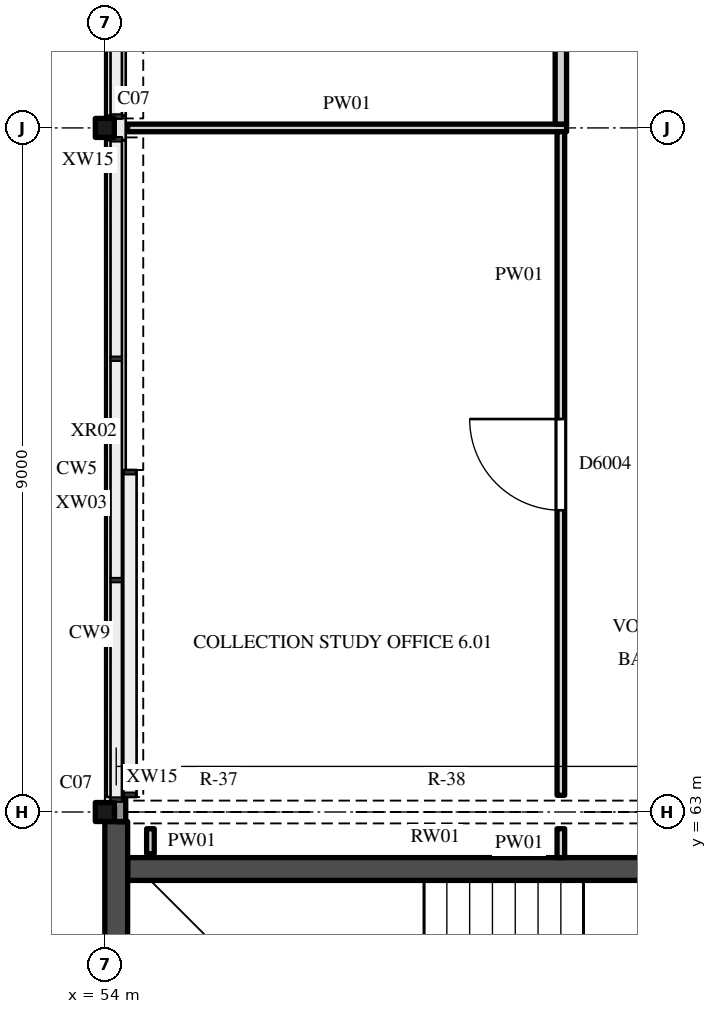
"""IFC4 building model, lengths in metres.
Left out: names, types, materials, properties, quantities, classifications, styles, units other than length and angle.
Written with IfcOpenShell. Run it as: python <this file> out.ifc"""

import sys

from ifc_helpers import new_model, si_unit, direction, frame, frame_2d, origin, origin_2d, place, context, subcontext, project, spatial, polyline, rectangle, hollow_rectangle, outline, extrude, element, fill, save


model = new_model("IFC4")
c1 = context("Model", 3, precision=1e-05, world=origin(), true_north=direction((0.0, 1.0)))
c2 = subcontext(c1, "Body", "Model", "MODEL_VIEW")
j1 = project(units=[si_unit("LENGTHUNIT", "METRE"), si_unit("PLANEANGLEUNIT", "RADIAN")], contexts=[c1])
p1 = place(None, origin())
s1 = spatial("IfcSite", under=j1, at=p1, CompositionType="ELEMENT")
p2 = place(p1, origin())
s2 = spatial("IfcBuilding", under=s1, at=p2, CompositionType="ELEMENT")
p3 = place(p2, frame((0.0, 0.0, 36.0)))
s3 = spatial("IfcBuildingStorey", under=s2, at=p3, CompositionType="ELEMENT", Elevation=36.0)
for number, where, z_axis, x_axis in (
    (1, (54.0, 63.0, 0.0), (0.0, 0.0, 1.0), (1.0, 0.0, 0.0)),
    (2, (54.0, 72.0, 0.0), (0.0, 0.0, 1.0), (1.0, 0.0, 0.0)),
):
    element("IfcColumn", number, at=place(p3, frame(where, z_axis=z_axis, x_axis=x_axis)), inside=s3, PredefinedType="COLUMN", context=c2, shape_type="SweptSolid", body=[
        extrude(hollow_rectangle(XDim=0.25, YDim=0.25, WallThickness=0.009, InnerFilletRadius=0.013, OuterFilletRadius=0.022, at=origin_2d()), origin(), (0.0, 0.0, 1.0), 8.0),
    ])
p4 = place(p3, frame((54.3, 62.25, 0.0), z_axis=(0.0, 0.0, 1.0), x_axis=(1.0, 0.0, 0.0)))
e3 = element("IfcWall", 3, at=p4, inside=s3, PredefinedType="SHEAR", context=c2, shape_type="SweptSolid", body=[
    extrude(rectangle(XDim=8.1, YDim=0.3, at=frame_2d((4.05, 0.0))), origin(), (0.0, 0.0, 1.0), 14.344),
])
p5 = place(p3, frame((54.15, 54.125, 0.0), z_axis=(0.0, 0.0, 1.0), x_axis=(0.0, 1.0, 0.0)))
e4 = element("IfcWall", 4, at=p5, inside=s3, PredefinedType="SHEAR", context=c2, shape_type="SweptSolid", body=[
    extrude(outline(polyline([(0.0, 0.0), (8.75, 0.0), (8.75, 14.844), (0.0, 7.844), (0.0, 0.0)])), frame((0.0, 0.15, 0.0), z_axis=(0.0, -1.0, 0.0), x_axis=(1.0, 0.0, 0.0)), (0.0, 0.0, 1.0), 0.3),
])
for number, where, z_axis, x_axis in (
    (5, (54.15, 63.197, 0.0), (0.0, 0.0, 1.0), (0.0, 1.0, 0.0)),
    (6, (54.15, 72.161, 0.0), (0.0, 0.0, 1.0), (0.0, 1.0, 0.0)),
):
    element("IfcWall", number, at=place(p3, frame(where, z_axis=z_axis, x_axis=x_axis)), inside=s3, PredefinedType="SOLIDWALL", context=c2, shape_type="SweptSolid", body=[
        extrude(rectangle(XDim=8.642, YDim=0.25, at=frame_2d((4.321, 0.0))), origin(), (0.0, 0.0, 1.0), 1.1),
    ])
p6 = place(p3, frame((54.2, 62.875, 0.0), z_axis=(0.0, 0.0, 1.0), x_axis=(0.0, 1.0, 0.0)))
e7 = element("IfcWall", 7, at=p6, inside=s3, PredefinedType="SOLIDWALL", context=c2, shape_type="SweptSolid", body=[
    extrude(rectangle(XDim=0.322, YDim=0.15, at=frame_2d((0.161, 0.0))), origin(), (0.0, 0.0, 1.0), 14.844),
])
p7 = place(p3, frame((54.2, 71.839, 0.0), z_axis=(0.0, 0.0, 1.0), x_axis=(0.0, 1.0, 0.0)))
e8 = element("IfcWall", 8, at=p7, inside=s3, PredefinedType="SOLIDWALL", context=c2, shape_type="SweptSolid", body=[
    extrude(rectangle(XDim=0.322, YDim=0.15, at=frame_2d((0.161, 0.0))), origin(), (0.0, 0.0, 1.0), 1.1),
])
p8 = place(p3, frame((54.15, 63.0, 15.2), z_axis=(0.0, 0.0, 1.0), x_axis=(1.0, 0.0, 0.0)))
e9 = element("IfcWall", 9, at=p8, inside=s3, PredefinedType="SOLIDWALL", context=c2, shape_type="SweptSolid", body=[
    extrude(rectangle(XDim=62.7, YDim=0.3, at=frame_2d((31.35, 0.0))), origin(), (0.0, 0.0, 1.0), 0.9),
])
p9 = place(p8, frame((0.15, 0.0, 0.15)))
e10 = element("IfcOpeningElement", 10, at=p9, cuts=e9, PredefinedType="OPENING", context=c2, shape_type="SweptSolid", body=[
    extrude(rectangle(XDim=2.4, YDim=0.6, at=frame_2d((1.2, 0.3))), frame((0.0, 0.16, 0.0), z_axis=(0.0, -1.0, 0.0), x_axis=(1.0, 0.0, 0.0)), (0.0, 0.0, 1.0), 0.32),
])
p10 = place(p8, frame((3.15, 0.0, 0.15)))
e11 = element("IfcOpeningElement", 11, at=p10, cuts=e9, PredefinedType="OPENING", context=c2, shape_type="SweptSolid", body=[
    extrude(rectangle(XDim=2.4, YDim=0.6, at=frame_2d((1.2, 0.3))), frame((0.0, 0.16, 0.0), z_axis=(0.0, -1.0, 0.0), x_axis=(1.0, 0.0, 0.0)), (0.0, 0.0, 1.0), 0.32),
])
p11 = place(p8, frame((6.15, 0.0, 0.15)))
e12 = element("IfcOpeningElement", 12, at=p11, cuts=e9, PredefinedType="OPENING", context=c2, shape_type="SweptSolid", body=[
    extrude(rectangle(XDim=2.4, YDim=0.6, at=frame_2d((1.2, 0.3))), frame((0.0, 0.16, 0.0), z_axis=(0.0, -1.0, 0.0), x_axis=(1.0, 0.0, 0.0)), (0.0, 0.0, 1.0), 0.32),
])
p12 = place(p8, frame((9.15, 0.0, 0.15)))
e13 = element("IfcOpeningElement", 13, at=p12, cuts=e9, PredefinedType="OPENING", context=c2, shape_type="SweptSolid", body=[
    extrude(rectangle(XDim=2.4, YDim=0.6, at=frame_2d((1.2, 0.3))), frame((0.0, 0.16, 0.0), z_axis=(0.0, -1.0, 0.0), x_axis=(1.0, 0.0, 0.0)), (0.0, 0.0, 1.0), 0.32),
])
p13 = place(p8, frame((12.15, 0.0, 0.15)))
e14 = element("IfcOpeningElement", 14, at=p13, cuts=e9, PredefinedType="OPENING", context=c2, shape_type="SweptSolid", body=[
    extrude(rectangle(XDim=2.4, YDim=0.6, at=frame_2d((1.2, 0.3))), frame((0.0, 0.16, 0.0), z_axis=(0.0, -1.0, 0.0), x_axis=(1.0, 0.0, 0.0)), (0.0, 0.0, 1.0), 0.32),
])
p14 = place(p8, frame((15.15, 0.0, 0.15)))
e15 = element("IfcOpeningElement", 15, at=p14, cuts=e9, PredefinedType="OPENING", context=c2, shape_type="SweptSolid", body=[
    extrude(rectangle(XDim=2.4, YDim=0.6, at=frame_2d((1.2, 0.3))), frame((0.0, 0.16, 0.0), z_axis=(0.0, -1.0, 0.0), x_axis=(1.0, 0.0, 0.0)), (0.0, 0.0, 1.0), 0.32),
])
p15 = place(p8, frame((18.15, 0.0, 0.15)))
e16 = element("IfcOpeningElement", 16, at=p15, cuts=e9, PredefinedType="OPENING", context=c2, shape_type="SweptSolid", body=[
    extrude(rectangle(XDim=2.4, YDim=0.6, at=frame_2d((1.2, 0.3))), frame((0.0, 0.16, 0.0), z_axis=(0.0, -1.0, 0.0), x_axis=(1.0, 0.0, 0.0)), (0.0, 0.0, 1.0), 0.32),
])
p16 = place(p8, frame((21.15, 0.0, 0.15)))
e17 = element("IfcOpeningElement", 17, at=p16, cuts=e9, PredefinedType="OPENING", context=c2, shape_type="SweptSolid", body=[
    extrude(rectangle(XDim=2.4, YDim=0.6, at=frame_2d((1.2, 0.3))), frame((0.0, 0.16, 0.0), z_axis=(0.0, -1.0, 0.0), x_axis=(1.0, 0.0, 0.0)), (0.0, 0.0, 1.0), 0.32),
])
p17 = place(p8, frame((24.15, 0.0, 0.15)))
e18 = element("IfcOpeningElement", 18, at=p17, cuts=e9, PredefinedType="OPENING", context=c2, shape_type="SweptSolid", body=[
    extrude(rectangle(XDim=2.4, YDim=0.6, at=frame_2d((1.2, 0.3))), frame((0.0, 0.16, 0.0), z_axis=(0.0, -1.0, 0.0), x_axis=(1.0, 0.0, 0.0)), (0.0, 0.0, 1.0), 0.32),
])
p18 = place(p8, frame((27.15, 0.0, 0.15)))
e19 = element("IfcOpeningElement", 19, at=p18, cuts=e9, PredefinedType="OPENING", context=c2, shape_type="SweptSolid", body=[
    extrude(rectangle(XDim=2.4, YDim=0.6, at=frame_2d((1.2, 0.3))), frame((0.0, 0.16, 0.0), z_axis=(0.0, -1.0, 0.0), x_axis=(1.0, 0.0, 0.0)), (0.0, 0.0, 1.0), 0.32),
])
p19 = place(p8, frame((30.15, 0.0, 0.15)))
e20 = element("IfcOpeningElement", 20, at=p19, cuts=e9, PredefinedType="OPENING", context=c2, shape_type="SweptSolid", body=[
    extrude(rectangle(XDim=2.4, YDim=0.6, at=frame_2d((1.2, 0.3))), frame((0.0, 0.16, 0.0), z_axis=(0.0, -1.0, 0.0), x_axis=(1.0, 0.0, 0.0)), (0.0, 0.0, 1.0), 0.32),
])
p20 = place(p8, frame((33.15, 0.0, 0.15)))
e21 = element("IfcOpeningElement", 21, at=p20, cuts=e9, PredefinedType="OPENING", context=c2, shape_type="SweptSolid", body=[
    extrude(rectangle(XDim=2.4, YDim=0.6, at=frame_2d((1.2, 0.3))), frame((0.0, 0.16, 0.0), z_axis=(0.0, -1.0, 0.0), x_axis=(1.0, 0.0, 0.0)), (0.0, 0.0, 1.0), 0.32),
])
p21 = place(p8, frame((36.15, 0.0, 0.15)))
e22 = element("IfcOpeningElement", 22, at=p21, cuts=e9, PredefinedType="OPENING", context=c2, shape_type="SweptSolid", body=[
    extrude(rectangle(XDim=2.4, YDim=0.6, at=frame_2d((1.2, 0.3))), frame((0.0, 0.16, 0.0), z_axis=(0.0, -1.0, 0.0), x_axis=(1.0, 0.0, 0.0)), (0.0, 0.0, 1.0), 0.32),
])
p22 = place(p8, frame((39.15, 0.0, 0.15)))
e23 = element("IfcOpeningElement", 23, at=p22, cuts=e9, PredefinedType="OPENING", context=c2, shape_type="SweptSolid", body=[
    extrude(rectangle(XDim=2.4, YDim=0.6, at=frame_2d((1.2, 0.3))), frame((0.0, 0.16, 0.0), z_axis=(0.0, -1.0, 0.0), x_axis=(1.0, 0.0, 0.0)), (0.0, 0.0, 1.0), 0.32),
])
p23 = place(p8, frame((42.15, 0.0, 0.15)))
e24 = element("IfcOpeningElement", 24, at=p23, cuts=e9, PredefinedType="OPENING", context=c2, shape_type="SweptSolid", body=[
    extrude(rectangle(XDim=2.4, YDim=0.6, at=frame_2d((1.2, 0.3))), frame((0.0, 0.16, 0.0), z_axis=(0.0, -1.0, 0.0), x_axis=(1.0, 0.0, 0.0)), (0.0, 0.0, 1.0), 0.32),
])
p24 = place(p8, frame((45.15, 0.0, 0.15)))
e25 = element("IfcOpeningElement", 25, at=p24, cuts=e9, PredefinedType="OPENING", context=c2, shape_type="SweptSolid", body=[
    extrude(rectangle(XDim=2.4, YDim=0.6, at=frame_2d((1.2, 0.3))), frame((0.0, 0.16, 0.0), z_axis=(0.0, -1.0, 0.0), x_axis=(1.0, 0.0, 0.0)), (0.0, 0.0, 1.0), 0.32),
])
p25 = place(p8, frame((48.15, 0.0, 0.15)))
e26 = element("IfcOpeningElement", 26, at=p25, cuts=e9, PredefinedType="OPENING", context=c2, shape_type="SweptSolid", body=[
    extrude(rectangle(XDim=2.4, YDim=0.6, at=frame_2d((1.2, 0.3))), frame((0.0, 0.16, 0.0), z_axis=(0.0, -1.0, 0.0), x_axis=(1.0, 0.0, 0.0)), (0.0, 0.0, 1.0), 0.32),
])
p26 = place(p8, frame((51.15, 0.0, 0.15)))
e27 = element("IfcOpeningElement", 27, at=p26, cuts=e9, PredefinedType="OPENING", context=c2, shape_type="SweptSolid", body=[
    extrude(rectangle(XDim=2.4, YDim=0.6, at=frame_2d((1.2, 0.3))), frame((0.0, 0.16, 0.0), z_axis=(0.0, -1.0, 0.0), x_axis=(1.0, 0.0, 0.0)), (0.0, 0.0, 1.0), 0.32),
])
p27 = place(p8, frame((54.15, 0.0, 0.15)))
e28 = element("IfcOpeningElement", 28, at=p27, cuts=e9, PredefinedType="OPENING", context=c2, shape_type="SweptSolid", body=[
    extrude(rectangle(XDim=2.4, YDim=0.6, at=frame_2d((1.2, 0.3))), frame((0.0, 0.16, 0.0), z_axis=(0.0, -1.0, 0.0), x_axis=(1.0, 0.0, 0.0)), (0.0, 0.0, 1.0), 0.32),
])
p28 = place(p8, frame((57.15, 0.0, 0.15)))
e29 = element("IfcOpeningElement", 29, at=p28, cuts=e9, PredefinedType="OPENING", context=c2, shape_type="SweptSolid", body=[
    extrude(rectangle(XDim=2.4, YDim=0.6, at=frame_2d((1.2, 0.3))), frame((0.0, 0.16, 0.0), z_axis=(0.0, -1.0, 0.0), x_axis=(1.0, 0.0, 0.0)), (0.0, 0.0, 1.0), 0.32),
])
p29 = place(p8, frame((60.15, 0.0, 0.15)))
e30 = element("IfcOpeningElement", 30, at=p29, cuts=e9, PredefinedType="OPENING", context=c2, shape_type="SweptSolid", body=[
    extrude(rectangle(XDim=2.4, YDim=0.6, at=frame_2d((1.2, 0.3))), frame((0.0, 0.16, 0.0), z_axis=(0.0, -1.0, 0.0), x_axis=(1.0, 0.0, 0.0)), (0.0, 0.0, 1.0), 0.32),
])
p30 = place(p3, frame((54.331, 63.197, 11.0), z_axis=(0.0, 0.0, 1.0), x_axis=(0.0, 1.0, 0.0)))
e31 = element("IfcWall", 31, at=p30, inside=s3, PredefinedType="SOLIDWALL", context=c2, shape_type="SweptSolid", body=[
    extrude(outline(polyline([(0.0, 0.0), (4.303, 0.0), (4.303, 0.344), (0.0, 3.786), (0.0, 0.0)])), frame((0.0, 0.175, 0.0), z_axis=(0.0, -1.0, 0.0), x_axis=(1.0, 0.0, 0.0)), (0.0, 0.0, 1.0), 0.35),
])
p31 = place(p3, frame((54.331, 67.5, 7.8), z_axis=(0.0, 0.0, 1.0), x_axis=(0.0, 1.0, 0.0)))
e32 = element("IfcWall", 32, at=p31, inside=s3, PredefinedType="SOLIDWALL", context=c2, shape_type="SweptSolid", body=[
    extrude(outline(polyline([(0.0, 0.0), (4.375, 0.0), (4.375, 0.044), (0.0, 3.544), (0.0, 0.0)])), frame((0.0, 0.175, 0.0), z_axis=(0.0, -1.0, 0.0), x_axis=(1.0, 0.0, 0.0)), (0.0, 0.0, 1.0), 0.35),
])
p32 = place(p3, frame((54.331, 72.125, 7.8), z_axis=(0.0, 0.0, 1.0), x_axis=(0.0, 1.0, 0.0)))
e33 = element("IfcWall", 33, at=p32, inside=s3, PredefinedType="SOLIDWALL", context=c2, shape_type="SweptSolid", body=[
    extrude(outline(polyline([(0.0, 0.0), (4.375, 0.0), (4.375, 3.544), (0.0, 0.044), (0.0, 0.0)])), frame((0.0, 0.175, 0.0), z_axis=(0.0, -1.0, 0.0), x_axis=(1.0, 0.0, 0.0)), (0.0, 0.0, 1.0), 0.35),
])
p33 = place(p3, frame((54.3, 72.0, 0.0), z_axis=(0.0, 0.0, 1.0), x_axis=(1.0, 0.0, 0.0)))
e34 = element("IfcWall", 34, at=p33, inside=s3, PredefinedType="PARTITIONING", context=c2, shape_type="SweptSolid", body=[
    extrude(rectangle(XDim=5.775, YDim=0.1, at=frame_2d((2.887, 0.0))), origin(), (0.0, 0.0, 1.0), 7.366),
])
p34 = place(p3, frame((54.6, 62.45, 0.0), z_axis=(0.0, 0.0, 1.0), x_axis=(0.0, 1.0, 0.0)))
e35 = element("IfcWall", 35, at=p34, inside=s3, PredefinedType="PARTITIONING", context=c2, shape_type="SweptSolid", body=[
    extrude(rectangle(XDim=0.33, YDim=0.1, at=frame_2d((0.165, 0.0))), origin(), (0.0, 0.0, 1.0), 7.744),
])
p35 = place(p3, frame((60.0, 62.4, 0.0), z_axis=(0.0, 0.0, 1.0), x_axis=(0.0, 1.0, 0.0)))
e36 = element("IfcWall", 36, at=p35, inside=s3, PredefinedType="PARTITIONING", context=c2, shape_type="SweptSolid", body=[
    extrude(rectangle(XDim=0.38, YDim=0.1, at=frame_2d((0.19, 0.0))), origin(), (0.0, 0.0, 1.0), 7.744),
])
p36 = place(p3, frame((60.0, 63.22, 0.0), z_axis=(0.0, 0.0, 1.0), x_axis=(0.0, 1.0, 0.0)))
e37 = element("IfcWall", 37, at=p36, inside=s3, PredefinedType="PARTITIONING", context=c2, shape_type="SweptSolid", body=[
    extrude(rectangle(XDim=8.73, YDim=0.1, at=frame_2d((4.365, 0.0))), origin(), (0.0, 0.0, 1.0), 7.744),
])
p37 = place(p36, frame((3.75, 0.0, 0.0)))
e38 = element("IfcOpeningElement", 38, at=p37, cuts=e37, PredefinedType="OPENING", context=c2, shape_type="SweptSolid", body=[
    extrude(rectangle(XDim=1.2, YDim=2.4, at=frame_2d((0.6, 1.2))), frame((0.0, 0.06, 0.0), z_axis=(0.0, -1.0, 0.0), x_axis=(1.0, 0.0, 0.0)), (0.0, 0.0, 1.0), 0.12),
])
p38 = place(p3, frame((60.0, 72.05, 0.0), z_axis=(0.0, 0.0, 1.0), x_axis=(0.0, 1.0, 0.0)))
e39 = element("IfcWall", 39, at=p38, inside=s3, PredefinedType="PARTITIONING", context=c2, shape_type="SweptSolid", body=[
    extrude(rectangle(XDim=8.73, YDim=0.15, at=frame_2d((4.365, 0.0))), origin(), (0.0, 0.0, 1.0), 7.744),
])
p39 = place(p38, frame((3.65, 0.0, 0.0)))
e40 = element("IfcOpeningElement", 40, at=p39, cuts=e39, PredefinedType="OPENING", context=c2, shape_type="SweptSolid", body=[
    extrude(rectangle(XDim=1.5, YDim=2.1, at=frame_2d((0.75, 1.05))), frame((0.0, 0.085, 0.0), z_axis=(0.0, -1.0, 0.0), x_axis=(1.0, 0.0, 0.0)), (0.0, 0.0, 1.0), 0.17),
])
p40 = place(p9, origin())
e41 = element("IfcWindow", 41, at=p40, inside=s3, PartitioningType="SINGLE_PANEL", PredefinedType="SKYLIGHT", context=c2, shape_type="SweptSolid", body=[
    extrude(rectangle(XDim=2.4, YDim=0.6, at=frame_2d((1.2, 0.3))), frame((0.0, 0.03, 0.0), z_axis=(0.0, -1.0, 0.0), x_axis=(1.0, 0.0, 0.0)), (0.0, 0.0, 1.0), 0.06),
])
fill(e10, e41)
p41 = place(p10, origin())
e42 = element("IfcWindow", 42, at=p41, inside=s3, PartitioningType="SINGLE_PANEL", PredefinedType="SKYLIGHT", context=c2, shape_type="SweptSolid", body=[
    extrude(rectangle(XDim=2.4, YDim=0.6, at=frame_2d((1.2, 0.3))), frame((0.0, 0.03, 0.0), z_axis=(0.0, -1.0, 0.0), x_axis=(1.0, 0.0, 0.0)), (0.0, 0.0, 1.0), 0.06),
])
fill(e11, e42)
p42 = place(p11, origin())
e43 = element("IfcWindow", 43, at=p42, inside=s3, PartitioningType="SINGLE_PANEL", PredefinedType="SKYLIGHT", context=c2, shape_type="SweptSolid", body=[
    extrude(rectangle(XDim=2.4, YDim=0.6, at=frame_2d((1.2, 0.3))), frame((0.0, 0.03, 0.0), z_axis=(0.0, -1.0, 0.0), x_axis=(1.0, 0.0, 0.0)), (0.0, 0.0, 1.0), 0.06),
])
fill(e12, e43)
p43 = place(p37, origin())
e44 = element("IfcDoor", 44, at=p43, inside=s3, OperationType="SINGLE_SWING_LEFT", PredefinedType="DOOR", context=c2, shape_type="SweptSolid", body=[
    extrude(rectangle(XDim=1.2, YDim=2.4, at=frame_2d((0.6, 1.2))), frame((0.0, 0.025, 0.0), z_axis=(0.0, -1.0, 0.0), x_axis=(1.0, 0.0, 0.0)), (0.0, 0.0, 1.0), 0.05),
])
fill(e38, e44)
save(model, sys.argv[1])
